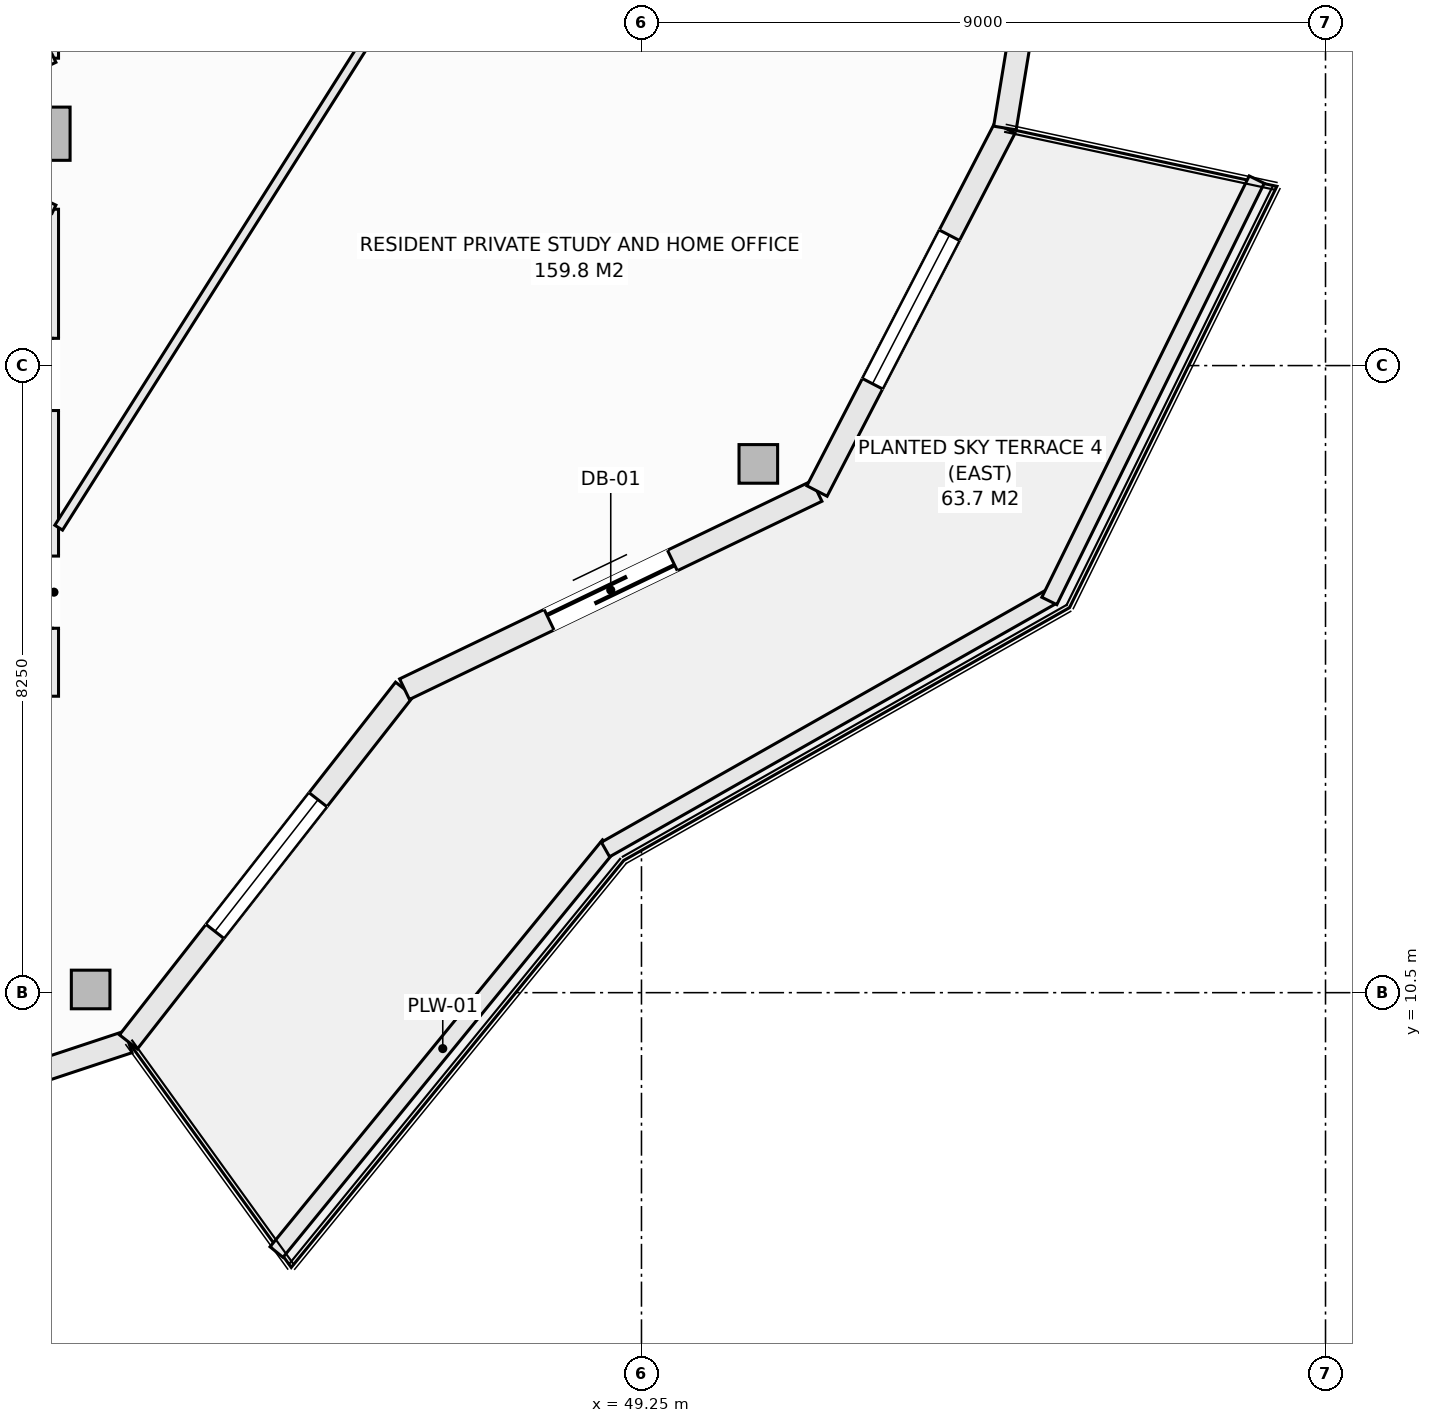
"""IFC4 building model, lengths in metres.
Left out: names, types, materials, properties, quantities, classifications, styles, units other than length and angle.
Written with IfcOpenShell. Run it as: python <this file> out.ifc"""

import sys

from ifc_helpers import new_model, si_unit, direction, frame, frame_2d, origin, origin_2d, place, context, subcontext, project, spatial, rectangle, hollow_rectangle, extrude, element, fill, save


model = new_model("IFC4")
c1 = context("Model", 3, precision=1e-05, world=origin(), true_north=direction((0.0, 1.0)))
c2 = subcontext(c1, "Body", "Model", "MODEL_VIEW")
j1 = project(units=[si_unit("LENGTHUNIT", "METRE"), si_unit("PLANEANGLEUNIT", "RADIAN")], contexts=[c1])
p1 = place(None, origin())
s1 = spatial("IfcSite", under=j1, at=p1, CompositionType="ELEMENT")
p2 = place(p1, origin())
s2 = spatial("IfcBuilding", under=s1, at=p2, CompositionType="ELEMENT")
p3 = place(p2, frame((0.0, 0.0, 203.0)))
s3 = spatial("IfcBuildingStorey", under=s2, at=p3, CompositionType="ELEMENT", Elevation=203.0)
for number, where, z_axis, x_axis in (
    (1, (42.003, 10.542, -0.27), (0.0, 0.0, 1.0), (1.0, 0.0, 0.0)),
    (2, (50.787, 17.456, -0.27), (0.0, 0.0, 1.0), (1.0, 0.0, 0.0)),
):
    element("IfcColumn", number, at=place(p3, frame(where, z_axis=z_axis, x_axis=x_axis)), inside=s3, PredefinedType="COLUMN", context=c2, shape_type="SweptSolid", body=[
        extrude(hollow_rectangle(XDim=0.508, YDim=0.508, WallThickness=0.019, at=origin_2d()), origin(), (0.0, 0.0, 1.0), 3.3),
    ])
p4 = place(p3, frame((41.382, 21.801, -0.27), z_axis=(0.0, 0.0, 1.0), x_axis=(1.0, 0.0, 0.0)))
e3 = element("IfcColumn", 3, at=p4, inside=s3, PredefinedType="COLUMN", context=c2, shape_type="SweptSolid", body=[
    extrude(rectangle(XDim=0.7, YDim=0.7, at=origin_2d()), origin(), (0.0, 0.0, 1.0), 3.3),
])
p5 = place(p3, frame((36.531, 7.875, 0.0), z_axis=(0.0, 0.0, 1.0), x_axis=(0.949240877604, 0.314550085495, 0.0)))
e4 = element("IfcWall", 4, at=p5, inside=s3, PredefinedType="SOLIDWALL", context=c2, shape_type="SweptSolid", body=[
    extrude(rectangle(XDim=6.288, YDim=0.3, at=frame_2d((3.144, 0.0))), origin(), (0.0, 0.0, 1.0), 2.605),
])
p6 = place(p5, frame((2.044, 0.0, 0.72)))
e5 = element("IfcOpeningElement", 5, at=p6, cuts=e4, PredefinedType="OPENING", context=c2, shape_type="SweptSolid", body=[
    extrude(rectangle(XDim=2.2, YDim=1.65, at=frame_2d((1.1, 0.825))), frame((0.0, 0.16, 0.0), z_axis=(0.0, -1.0, 0.0), x_axis=(1.0, 0.0, 0.0)), (0.0, 0.0, 1.0), 0.32),
])
p7 = place(p3, frame((42.5, 9.853, 0.0), z_axis=(0.0, 0.0, 1.0), x_axis=(0.616450126935, 0.787393955401, 0.0)))
e6 = element("IfcWall", 6, at=p7, inside=s3, PredefinedType="SOLIDWALL", context=c2, shape_type="SweptSolid", body=[
    extrude(rectangle(XDim=5.893, YDim=0.3, at=frame_2d((2.946, 0.0))), origin(), (0.0, 0.0, 1.0), 2.605),
])
p8 = place(p7, frame((1.846, 0.0, 0.72)))
e7 = element("IfcOpeningElement", 7, at=p8, cuts=e6, PredefinedType="OPENING", context=c2, shape_type="SweptSolid", body=[
    extrude(rectangle(XDim=2.2, YDim=1.65, at=frame_2d((1.1, 0.825))), frame((0.0, 0.16, 0.0), z_axis=(0.0, -1.0, 0.0), x_axis=(1.0, 0.0, 0.0)), (0.0, 0.0, 1.0), 0.32),
])
p9 = place(p3, frame((46.133, 14.493, 0.0), z_axis=(0.0, 0.0, 1.0), x_axis=(0.901348331142, 0.433094892545, 0.0)))
e8 = element("IfcWall", 8, at=p9, inside=s3, PredefinedType="SOLIDWALL", context=c2, shape_type="SweptSolid", body=[
    extrude(rectangle(XDim=6.021, YDim=0.3, at=frame_2d((3.01, 0.0))), origin(), (0.0, 0.0, 1.0), 2.605),
])
p10 = place(p9, frame((2.11, 0.0, 0.0)))
e9 = element("IfcOpeningElement", 9, at=p10, cuts=e8, PredefinedType="OPENING", context=c2, shape_type="SweptSolid", body=[
    extrude(rectangle(XDim=1.8, YDim=2.25, at=frame_2d((0.9, 1.125))), frame((0.0, 0.16, 0.0), z_axis=(0.0, -1.0, 0.0), x_axis=(1.0, 0.0, 0.0)), (0.0, 0.0, 1.0), 0.32),
])
p11 = place(p3, frame((51.559, 17.1, 0.0), z_axis=(0.0, 0.0, 1.0), x_axis=(0.459808219482, 0.888018243786, 0.0)))
e10 = element("IfcWall", 10, at=p11, inside=s3, PredefinedType="SOLIDWALL", context=c2, shape_type="SweptSolid", body=[
    extrude(rectangle(XDim=5.378, YDim=0.3, at=frame_2d((2.689, 0.0))), origin(), (0.0, 0.0, 1.0), 2.605),
])
p12 = place(p11, frame((1.589, 0.0, 0.72)))
e11 = element("IfcOpeningElement", 11, at=p12, cuts=e10, PredefinedType="OPENING", context=c2, shape_type="SweptSolid", body=[
    extrude(rectangle(XDim=2.2, YDim=1.65, at=frame_2d((1.1, 0.825))), frame((0.0, 0.16, 0.0), z_axis=(0.0, -1.0, 0.0), x_axis=(1.0, 0.0, 0.0)), (0.0, 0.0, 1.0), 0.32),
])
p13 = place(p3, frame((54.032, 21.875, 0.0), z_axis=(0.0, 0.0, 1.0), x_axis=(0.16237087798, 0.986729799886, 0.0)))
e12 = element("IfcWall", 12, at=p13, inside=s3, PredefinedType="SOLIDWALL", context=c2, shape_type="SweptSolid", body=[
    extrude(rectangle(XDim=5.193, YDim=0.3, at=frame_2d((2.597, 0.0))), origin(), (0.0, 0.0, 1.0), 2.605),
])
p14 = place(p13, frame((1.497, 0.0, 0.72)))
e13 = element("IfcOpeningElement", 13, at=p14, cuts=e12, PredefinedType="OPENING", context=c2, shape_type="SweptSolid", body=[
    extrude(rectangle(XDim=2.2, YDim=1.65, at=frame_2d((1.1, 0.825))), frame((0.0, 0.16, 0.0), z_axis=(0.0, -1.0, 0.0), x_axis=(1.0, 0.0, 0.0)), (0.0, 0.0, 1.0), 0.32),
])
p15 = place(p3, frame((44.448, 7.087, 0.0), z_axis=(0.0, 0.0, 1.0), x_axis=(0.632697312147, 0.774399193699, 0.0)))
e14 = element("IfcWall", 14, at=p15, inside=s3, PredefinedType="PARAPET", context=c2, shape_type="SweptSolid", body=[
    extrude(rectangle(XDim=6.914, YDim=0.22, at=frame_2d((3.457, 0.0))), origin(), (0.0, 0.0, 1.0), 0.52),
])
p16 = place(p3, frame((48.776, 12.383, 0.0), z_axis=(0.0, 0.0, 1.0), x_axis=(0.869860619267, 0.493297580623, 0.0)))
e15 = element("IfcWall", 15, at=p16, inside=s3, PredefinedType="PARAPET", context=c2, shape_type="SweptSolid", body=[
    extrude(rectangle(XDim=6.743, YDim=0.22, at=frame_2d((3.371, 0.0))), origin(), (0.0, 0.0, 1.0), 0.52),
])
p17 = place(p3, frame((54.616, 15.653, 0.0), z_axis=(0.0, 0.0, 1.0), x_axis=(0.441640961804, 0.897191875162, 0.0)))
e16 = element("IfcWall", 16, at=p17, inside=s3, PredefinedType="PARAPET", context=c2, shape_type="SweptSolid", body=[
    extrude(rectangle(XDim=6.178, YDim=0.22, at=frame_2d((3.089, 0.0))), origin(), (0.0, 0.0, 1.0), 0.52),
])
p18 = place(p3, frame((41.52, 14.4, 0.0), z_axis=(0.0, 0.0, 1.0), x_axis=(0.0, 1.0, 0.0)))
e17 = element("IfcWall", 17, at=p18, inside=s3, PredefinedType="PARTITIONING", context=c2, shape_type="SweptSolid", body=[
    extrude(rectangle(XDim=6.407, YDim=0.12, at=frame_2d((3.204, 0.0))), origin(), (0.0, 0.0, 1.0), 3.03),
])
p19 = place(p18, frame((0.894, 0.0, 0.0)))
e18 = element("IfcOpeningElement", 18, at=p19, cuts=e17, PredefinedType="OPENING", context=c2, shape_type="SweptSolid", body=[
    extrude(rectangle(XDim=0.95, YDim=2.1, at=frame_2d((0.475, 1.05))), frame((0.0, 0.07, 0.0), z_axis=(0.0, -1.0, 0.0), x_axis=(1.0, 0.0, 0.0)), (0.0, 0.0, 1.0), 0.14),
])
p20 = place(p18, frame((3.759, 0.0, 0.0)))
e19 = element("IfcOpeningElement", 19, at=p20, cuts=e17, PredefinedType="OPENING", context=c2, shape_type="SweptSolid", body=[
    extrude(rectangle(XDim=0.95, YDim=2.1, at=frame_2d((0.475, 1.05))), frame((0.0, 0.07, 0.0), z_axis=(0.0, -1.0, 0.0), x_axis=(1.0, 0.0, 0.0)), (0.0, 0.0, 1.0), 0.14),
])
p21 = place(p3, frame((41.52, 22.794, 0.0), z_axis=(0.0, 0.0, 1.0), x_axis=(0.0, 1.0, 0.0)))
e20 = element("IfcWall", 20, at=p21, inside=s3, PredefinedType="PARTITIONING", context=c2, shape_type="SweptSolid", body=[
    extrude(rectangle(XDim=4.654, YDim=0.12, at=frame_2d((2.327, 0.0))), origin(), (0.0, 0.0, 1.0), 2.478),
])
for number, where, z_axis, x_axis in (
    (21, (40.986, 22.541, 0.0), (0.0, 0.0, 1.0), (0.904, 0.428, 0.0)),
    (22, (40.986, 21.06, 0.0), (0.0, 0.0, 1.0), (0.904, -0.428, 0.0)),
):
    element("IfcWall", number, at=place(p3, frame(where, z_axis=z_axis, x_axis=x_axis)), inside=s3, PredefinedType="PARTITIONING", context=c2, shape_type="SweptSolid", body=[
        extrude(rectangle(XDim=0.591, YDim=0.12, at=frame_2d((0.295, 0.0))), origin(), (0.0, 0.0, 1.0), 3.03),
    ])
p22 = place(p3, frame((41.582, 16.617, 0.0), z_axis=(0.0, 0.0, 1.0), x_axis=(0.534374121444, 0.845248069108, 0.0)))
e23 = element("IfcWall", 23, at=p22, inside=s3, PredefinedType="PARTITIONING", context=c2, shape_type="SweptSolid", body=[
    extrude(rectangle(XDim=20.892, YDim=0.12, at=frame_2d((10.446, 0.0))), origin(), (0.0, 0.0, 1.0), 3.03),
])
p23 = place(p8, origin())
e24 = element("IfcWindow", 24, at=p23, inside=s3, PartitioningType="SINGLE_PANEL", PredefinedType="WINDOW", context=c2, shape_type="SweptSolid", body=[
    extrude(rectangle(XDim=2.2, YDim=1.65, at=frame_2d((1.1, 0.825))), frame((0.0, 0.03, 0.0), z_axis=(0.0, -1.0, 0.0), x_axis=(1.0, 0.0, 0.0)), (0.0, 0.0, 1.0), 0.06),
])
fill(e7, e24)
p24 = place(p10, frame((1.8, 0.0, 0.0), z_axis=(0.0, 0.0, 1.0), x_axis=(-1.0, 0.0, 0.0)))
e25 = element("IfcDoor", 25, at=p24, inside=s3, OperationType="SLIDING_TO_LEFT", PredefinedType="DOOR", context=c2, shape_type="SweptSolid", body=[
    extrude(rectangle(XDim=1.8, YDim=2.25, at=frame_2d((0.9, 1.125))), frame((0.0, 0.025, 0.0), z_axis=(0.0, -1.0, 0.0), x_axis=(1.0, 0.0, 0.0)), (0.0, 0.0, 1.0), 0.05),
])
fill(e9, e25)
p25 = place(p12, origin())
e26 = element("IfcWindow", 26, at=p25, inside=s3, PartitioningType="SINGLE_PANEL", PredefinedType="WINDOW", context=c2, shape_type="SweptSolid", body=[
    extrude(rectangle(XDim=2.2, YDim=1.65, at=frame_2d((1.1, 0.825))), frame((0.0, 0.03, 0.0), z_axis=(0.0, -1.0, 0.0), x_axis=(1.0, 0.0, 0.0)), (0.0, 0.0, 1.0), 0.06),
])
fill(e11, e26)
p26 = place(p19, origin())
e27 = element("IfcDoor", 27, at=p26, inside=s3, OperationType="SINGLE_SWING_LEFT", PredefinedType="DOOR", context=c2, shape_type="SweptSolid", body=[
    extrude(rectangle(XDim=0.95, YDim=2.1, at=frame_2d((0.475, 1.05))), frame((0.0, 0.025, 0.0), z_axis=(0.0, -1.0, 0.0), x_axis=(1.0, 0.0, 0.0)), (0.0, 0.0, 1.0), 0.05),
])
fill(e18, e27)
p27 = place(p20, origin())
e28 = element("IfcDoor", 28, at=p27, inside=s3, OperationType="SINGLE_SWING_RIGHT", PredefinedType="DOOR", context=c2, shape_type="SweptSolid", body=[
    extrude(rectangle(XDim=0.95, YDim=2.1, at=frame_2d((0.475, 1.05))), frame((0.0, 0.025, 0.0), z_axis=(0.0, -1.0, 0.0), x_axis=(1.0, 0.0, 0.0)), (0.0, 0.0, 1.0), 0.05),
])
fill(e19, e28)
save(model, sys.argv[1])
